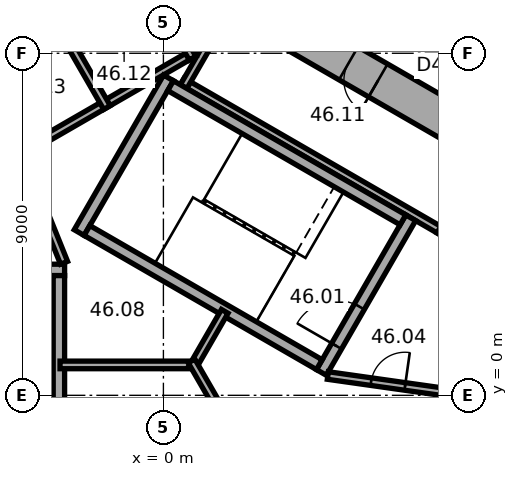
"""IFC4 building model, lengths in metres.
Left out: names, types, materials, properties, quantities, classifications, styles, units other than length and angle.
Written with IfcOpenShell. Run it as: python <this file> out.ifc"""

import sys

from ifc_helpers import new_model, si_unit, direction, frame, frame_2d, origin, place, context, subcontext, project, spatial, rectangle, extrude, element, fill, save


model = new_model("IFC4")
c1 = context("Model", 3, precision=1e-05, world=origin(), true_north=direction((0.0, 1.0)))
c2 = subcontext(c1, "Body", "Model", "MODEL_VIEW")
j1 = project(units=[si_unit("LENGTHUNIT", "METRE"), si_unit("PLANEANGLEUNIT", "RADIAN")], contexts=[c1])
p1 = place(None, origin())
s1 = spatial("IfcSite", under=j1, at=p1, CompositionType="ELEMENT")
p2 = place(p1, origin())
s2 = spatial("IfcBuilding", under=s1, at=p2, CompositionType="ELEMENT")
p3 = place(p2, frame((0.0, 0.0, 187.3)))
s3 = spatial("IfcBuildingStorey", under=s2, at=p3, CompositionType="ELEMENT", Elevation=187.3)
p4 = place(p3, frame((10.25, 5.629, 0.0), z_axis=(0.0, 0.0, 1.0), x_axis=(-0.866022616891, 0.50000482701, 0.0)))
e1 = element("IfcWall", 1, at=p4, inside=s3, PredefinedType="SHEAR", context=c2, shape_type="SweptSolid", body=[
    extrude(rectangle(XDim=12.125, YDim=1.0, at=frame_2d((6.062, 0.0))), origin(), (0.0, 0.0, 1.0), 3.7),
])
p5 = place(p4, frame((5.312, 0.0, 0.0)))
e2 = element("IfcOpeningElement", 2, at=p5, cuts=e1, PredefinedType="OPENING", context=c2, shape_type="SweptSolid", body=[
    extrude(rectangle(XDim=0.9, YDim=2.1, at=frame_2d((0.45, 1.05))), frame((0.0, 0.51, 0.0), z_axis=(0.0, -1.0, 0.0), x_axis=(1.0, 0.0, 0.0)), (0.0, 0.0, 1.0), 1.02),
])
p6 = place(p3, frame((0.25, 11.691, 0.0), z_axis=(0.0, 0.0, 1.0), x_axis=(-0.866022616891, -0.50000482701, 0.0)))
e3 = element("IfcWall", 3, at=p6, inside=s3, PredefinedType="SHEAR", context=c2, shape_type="SweptSolid", body=[
    extrude(rectangle(XDim=12.125, YDim=1.0, at=frame_2d((6.062, 0.0))), origin(), (0.0, 0.0, 1.0), 3.7),
])
p7 = place(p6, frame((6.262, 0.0, 0.0)))
e4 = element("IfcOpeningElement", 4, at=p7, cuts=e3, PredefinedType="OPENING", context=c2, shape_type="SweptSolid", body=[
    extrude(rectangle(XDim=1.5, YDim=2.1, at=frame_2d((0.75, 1.05))), frame((0.0, 0.51, 0.0), z_axis=(0.0, -1.0, 0.0), x_axis=(1.0, 0.0, 0.0)), (0.0, 0.0, 1.0), 1.02),
])
p8 = place(p6, frame((1.812, 0.0, 0.0)))
e5 = element("IfcOpeningElement", 5, at=p8, cuts=e3, PredefinedType="OPENING", context=c2, shape_type="SweptSolid", body=[
    extrude(rectangle(XDim=0.9, YDim=2.1, at=frame_2d((0.45, 1.05))), frame((0.0, 0.51, 0.0), z_axis=(0.0, -1.0, 0.0), x_axis=(1.0, 0.0, 0.0)), (0.0, 0.0, 1.0), 1.02),
])
p9 = place(p6, frame((4.412, 0.0, 0.0)))
e6 = element("IfcOpeningElement", 6, at=p9, cuts=e3, PredefinedType="OPENING", context=c2, shape_type="SweptSolid", body=[
    extrude(rectangle(XDim=0.9, YDim=2.1, at=frame_2d((0.45, 1.05))), frame((0.0, 0.51, 0.0), z_axis=(0.0, -1.0, 0.0), x_axis=(1.0, 0.0, 0.0)), (0.0, 0.0, 1.0), 1.02),
])
p10 = place(p3, frame((7.424, 4.259, 0.0), z_axis=(0.0, 0.0, 1.0), x_axis=(-0.866026010844, 0.49999894854, 0.0)))
e7 = element("IfcWall", 7, at=p10, inside=s3, PredefinedType="PARTITIONING", context=c2, shape_type="SweptSolid", body=[
    extrude(rectangle(XDim=8.0, YDim=0.2, at=frame_2d((4.0, 0.0))), origin(), (0.0, 0.0, 1.0), 3.42),
])
for number, where, z_axis, x_axis in (
    (8, (7.287, 4.222, 0.0), (0.0, 0.0, 1.0), (0.5, 0.866, 0.0)),
    (9, (0.532, 8.122, 0.0), (0.0, 0.0, 1.0), (0.5, 0.866, 0.0)),
):
    element("IfcWall", number, at=place(p3, frame(where, z_axis=z_axis, x_axis=x_axis)), inside=s3, PredefinedType="PARTITIONING", context=c2, shape_type="SweptSolid", body=[
        extrude(rectangle(XDim=2.2, YDim=0.2, at=frame_2d((1.1, 0.0))), origin(), (0.0, 0.0, 1.0), 3.42),
    ])
p11 = place(p3, frame((0.803, 9.009, 0.0), z_axis=(0.0, 0.0, 1.0), x_axis=(-0.866028230842, -0.499995103361, 0.0)))
e10 = element("IfcWall", 10, at=p11, inside=s3, PredefinedType="PARTITIONING", context=c2, shape_type="SweptSolid", body=[
    extrude(rectangle(XDim=5.4, YDim=0.2, at=frame_2d((2.7, 0.0))), origin(), (0.0, 0.0, 1.0), 3.42),
])
p12 = place(p3, frame((0.767, 8.872, 0.0), z_axis=(0.0, 0.0, 1.0), x_axis=(-0.499994660107, 0.866028486751, 0.0)))
e11 = element("IfcWall", 11, at=p12, inside=s3, PredefinedType="PARTITIONING", context=c2, shape_type="SweptSolid", body=[
    extrude(rectangle(XDim=2.2, YDim=0.2, at=frame_2d((1.1, 0.0))), origin(), (0.0, 0.0, 1.0), 3.42),
])
p13 = place(p3, frame((-1.485, 7.572, 0.0), z_axis=(0.0, 0.0, 1.0), x_axis=(-0.50002983664, 0.866008176907, 0.0)))
e12 = element("IfcWall", 12, at=p13, inside=s3, PredefinedType="PARTITIONING", context=c2, shape_type="SweptSolid", body=[
    extrude(rectangle(XDim=2.2, YDim=0.2, at=frame_2d((1.1, 0.0))), origin(), (0.0, 0.0, 1.0), 3.42),
])
p14 = place(p3, frame((4.158, 0.602, 0.0), z_axis=(0.0, 0.0, 1.0), x_axis=(0.499977259774, 0.866038532462, 0.0)))
e13 = element("IfcWall", 13, at=p14, inside=s3, PredefinedType="SHEAR", context=c2, shape_type="SweptSolid", body=[
    extrude(rectangle(XDim=4.7, YDim=0.3, at=frame_2d((2.35, 0.0))), origin(), (0.0, 0.0, 1.0), 3.42),
])
p15 = place(p14, frame((0.8, 0.0, 0.0)))
e14 = element("IfcOpeningElement", 14, at=p15, cuts=e13, PredefinedType="OPENING", context=c2, shape_type="SweptSolid", body=[
    extrude(rectangle(XDim=1.2, YDim=2.1, at=frame_2d((0.6, 1.05))), frame((0.0, 0.16, 0.0), z_axis=(0.0, -1.0, 0.0), x_axis=(1.0, 0.0, 0.0)), (0.0, 0.0, 1.0), 0.32),
])
p16 = place(p3, frame((-2.216, 4.282, 0.0), z_axis=(0.0, 0.0, 1.0), x_axis=(0.499977259774, 0.866038532462, 0.0)))
e15 = element("IfcWall", 15, at=p16, inside=s3, PredefinedType="SHEAR", context=c2, shape_type="SweptSolid", body=[
    extrude(rectangle(XDim=4.7, YDim=0.3, at=frame_2d((2.35, 0.0))), origin(), (0.0, 0.0, 1.0), 3.42),
])
for number, where, z_axis, x_axis in (
    (16, (4.103, 0.807, 0.0), (0.0, 0.0, 1.0), (-0.866, 0.5, 0.0)),
    (17, (6.303, 4.617, 0.0), (0.0, 0.0, 1.0), (-0.866, 0.5, 0.0)),
):
    element("IfcWall", number, at=place(p3, frame(where, z_axis=z_axis, x_axis=x_axis)), inside=s3, PredefinedType="SHEAR", context=c2, shape_type="SweptSolid", body=[
        extrude(rectangle(XDim=7.06, YDim=0.3, at=frame_2d((3.53, 0.0))), origin(), (0.0, 0.0, 1.0), 3.42),
    ])
p17 = place(p3, frame((-2.6, 3.3, 0.0), z_axis=(0.0, 0.0, 1.0), x_axis=(-1.0, 0.0, 0.0)))
e18 = element("IfcWall", 18, at=p17, inside=s3, PredefinedType="SHEAR", context=c2, shape_type="SweptSolid", body=[
    extrude(rectangle(XDim=4.7, YDim=0.3, at=frame_2d((2.35, 0.0))), origin(), (0.0, 0.0, 1.0), 3.42),
])
p18 = place(p17, frame((0.8, 0.0, 0.0)))
e19 = element("IfcOpeningElement", 19, at=p18, cuts=e18, PredefinedType="OPENING", context=c2, shape_type="SweptSolid", body=[
    extrude(rectangle(XDim=1.2, YDim=2.1, at=frame_2d((0.6, 1.05))), frame((0.0, 0.16, 0.0), z_axis=(0.0, -1.0, 0.0), x_axis=(1.0, 0.0, 0.0)), (0.0, 0.0, 1.0), 0.32),
])
p19 = place(p3, frame((-2.75, 3.15, 0.0), z_axis=(0.0, 0.0, 1.0), x_axis=(0.0, -1.0, 0.0)))
e20 = element("IfcWall", 20, at=p19, inside=s3, PredefinedType="SHEAR", context=c2, shape_type="SweptSolid", body=[
    extrude(rectangle(XDim=7.06, YDim=0.3, at=frame_2d((3.53, 0.0))), origin(), (0.0, 0.0, 1.0), 3.42),
])
p20 = place(p3, frame((4.327, 0.521, 0.0), z_axis=(0.0, 0.0, 1.0), x_axis=(0.990124376366, -0.14019172346, 0.0)))
e21 = element("IfcWall", 21, at=p20, inside=s3, PredefinedType="PARTITIONING", context=c2, shape_type="SweptSolid", body=[
    extrude(rectangle(XDim=3.002, YDim=0.2, at=frame_2d((1.501, 0.0))), origin(), (0.0, 0.0, 1.0), 3.42),
])
p21 = place(p20, frame((1.15, 0.0, 0.0)))
e22 = element("IfcOpeningElement", 22, at=p21, cuts=e21, PredefinedType="OPENING", context=c2, shape_type="SweptSolid", body=[
    extrude(rectangle(XDim=0.9, YDim=2.1, at=frame_2d((0.45, 1.05))), frame((0.0, 0.11, 0.0), z_axis=(0.0, -1.0, 0.0), x_axis=(1.0, 0.0, 0.0)), (0.0, 0.0, 1.0), 0.22),
])
p22 = place(p3, frame((-2.615, 3.487, 0.0), z_axis=(0.0, 0.0, 1.0), x_axis=(-0.373576831041, 0.92759924068, 0.0)))
e23 = element("IfcWall", 23, at=p22, inside=s3, PredefinedType="PARTITIONING", context=c2, shape_type="SweptSolid", body=[
    extrude(rectangle(XDim=3.002, YDim=0.2, at=frame_2d((1.501, 0.0))), origin(), (0.0, 0.0, 1.0), 3.42),
])
p23 = place(p22, frame((1.15, 0.0, 0.0)))
e24 = element("IfcOpeningElement", 24, at=p23, cuts=e23, PredefinedType="OPENING", context=c2, shape_type="SweptSolid", body=[
    extrude(rectangle(XDim=0.9, YDim=2.1, at=frame_2d((0.45, 1.05))), frame((0.0, 0.11, 0.0), z_axis=(0.0, -1.0, 0.0), x_axis=(1.0, 0.0, 0.0)), (0.0, 0.0, 1.0), 0.22),
])
p24 = place(p3, frame((0.92, 0.8, 0.0), z_axis=(0.0, 0.0, 1.0), x_axis=(-1.0, 0.0, 0.0)))
e25 = element("IfcWall", 25, at=p24, inside=s3, PredefinedType="PARTITIONING", context=c2, shape_type="SweptSolid", body=[
    extrude(rectangle(XDim=3.64, YDim=0.2, at=frame_2d((1.82, 0.0))), origin(), (0.0, 0.0, 1.0), 3.42),
])
p25 = place(p3, frame((0.74, 0.696, 0.0), z_axis=(0.0, 0.0, 1.0), x_axis=(0.499956301907, 0.86605063142, 0.0)))
e26 = element("IfcWall", 26, at=p25, inside=s3, PredefinedType="PARTITIONING", context=c2, shape_type="SweptSolid", body=[
    extrude(rectangle(XDim=1.747, YDim=0.2, at=frame_2d((0.874, 0.0))), origin(), (0.0, 0.0, 1.0), 3.42),
])
p26 = place(p3, frame((0.74, 0.904, 0.0), z_axis=(0.0, 0.0, 1.0), x_axis=(0.500028278809, -0.866009076391, 0.0)))
e27 = element("IfcWall", 27, at=p26, inside=s3, PredefinedType="PARTITIONING", context=c2, shape_type="SweptSolid", body=[
    extrude(rectangle(XDim=3.133, YDim=0.2, at=frame_2d((1.566, 0.0))), origin(), (0.0, 0.0, 1.0), 3.42),
])
p27 = place(p3, frame((11.196, 7.854, 0.0), z_axis=(0.0, 0.0, 1.0), x_axis=(-0.866023877043, 0.500002644385, 0.0)))
e28 = element("IfcWall", 28, at=p27, inside=s3, PredefinedType="PARTITIONING", context=c2, shape_type="SweptSolid", body=[
    extrude(rectangle(XDim=11.792, YDim=0.2, at=frame_2d((5.896, 0.0))), origin(), (0.0, 0.0, 1.0), 3.42),
])
p28 = place(p27, frame((3.261, 0.0, 0.0)))
e29 = element("IfcOpeningElement", 29, at=p28, cuts=e28, PredefinedType="OPENING", context=c2, shape_type="SweptSolid", body=[
    extrude(rectangle(XDim=1.0, YDim=2.1, at=frame_2d((0.5, 1.05))), frame((0.0, 0.11, 0.0), z_axis=(0.0, -1.0, 0.0), x_axis=(1.0, 0.0, 0.0)), (0.0, 0.0, 1.0), 0.22),
])
p29 = place(p15, origin())
e30 = element("IfcDoor", 30, at=p29, inside=s3, OperationType="SINGLE_SWING_RIGHT", PredefinedType="DOOR", context=c2, shape_type="SweptSolid", body=[
    extrude(rectangle(XDim=1.2, YDim=2.1, at=frame_2d((0.6, 1.05))), frame((0.0, 0.025, 0.0), z_axis=(0.0, -1.0, 0.0), x_axis=(1.0, 0.0, 0.0)), (0.0, 0.0, 1.0), 0.05),
])
fill(e14, e30)
p30 = place(p21, origin())
e31 = element("IfcDoor", 31, at=p30, inside=s3, OperationType="SINGLE_SWING_LEFT", PredefinedType="DOOR", context=c2, shape_type="SweptSolid", body=[
    extrude(rectangle(XDim=0.9, YDim=2.1, at=frame_2d((0.45, 1.05))), frame((0.0, 0.025, 0.0), z_axis=(0.0, -1.0, 0.0), x_axis=(1.0, 0.0, 0.0)), (0.0, 0.0, 1.0), 0.05),
])
fill(e22, e31)
p31 = place(p5, origin())
e32 = element("IfcDoor", 32, at=p31, inside=s3, OperationType="SINGLE_SWING_LEFT", PredefinedType="DOOR", context=c2, shape_type="SweptSolid", body=[
    extrude(rectangle(XDim=0.9, YDim=2.1, at=frame_2d((0.45, 1.05))), frame((0.0, 0.025, 0.0), z_axis=(0.0, -1.0, 0.0), x_axis=(1.0, 0.0, 0.0)), (0.0, 0.0, 1.0), 0.05),
])
fill(e2, e32)
save(model, sys.argv[1])
